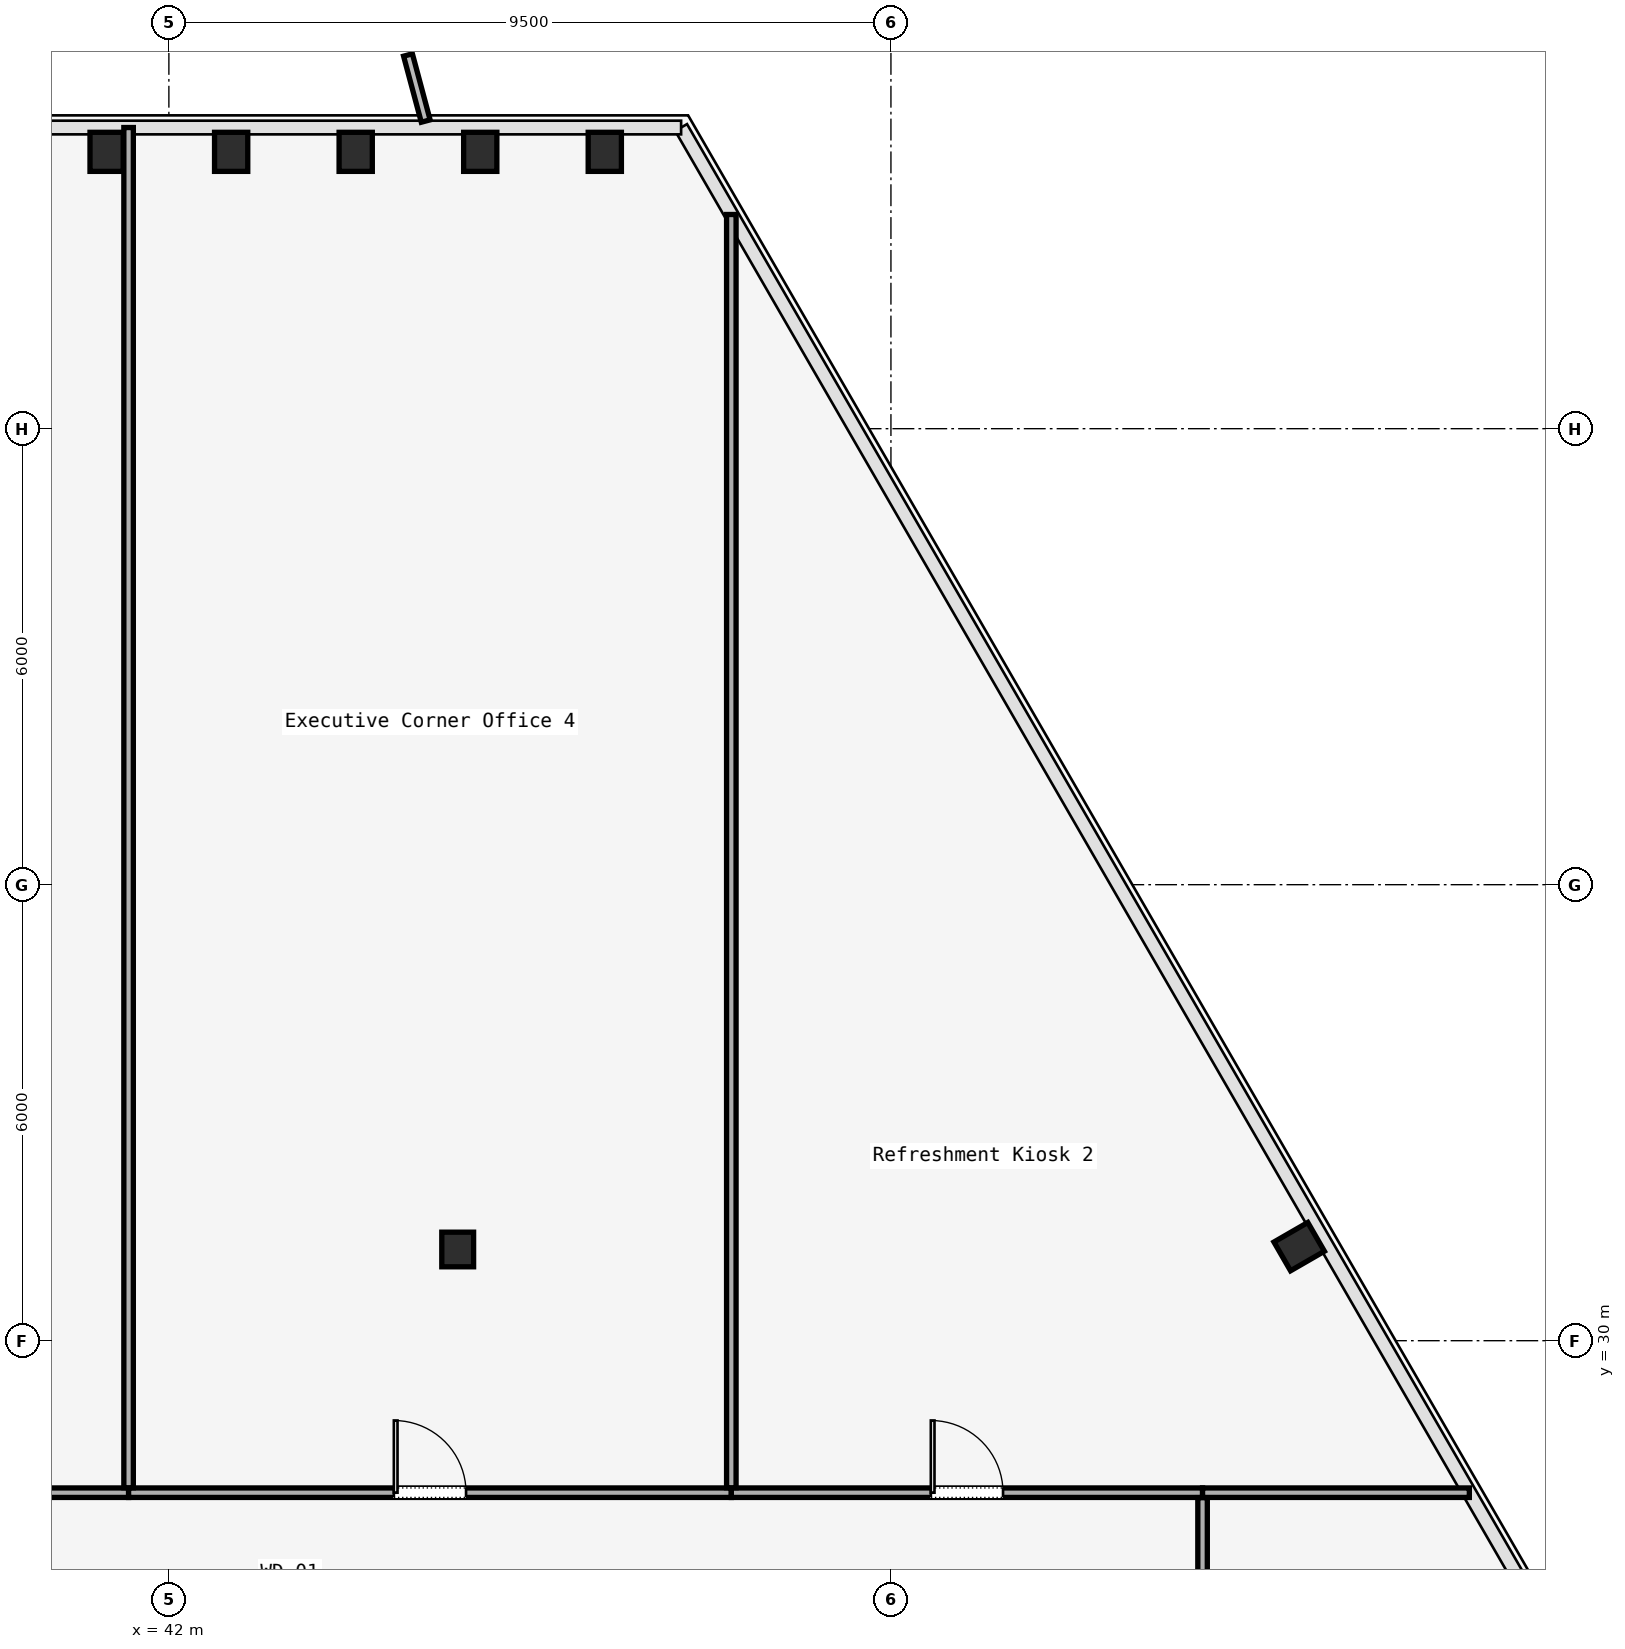
"""IFC4 building model, lengths in metres.
Left out: names, types, materials, properties, quantities, classifications, styles, units other than length and angle.
Written with IfcOpenShell. Run it as: python <this file> out.ifc"""

import sys

from ifc_helpers import new_model, si_unit, direction, frame, frame_2d, origin, origin_2d, place, context, subcontext, project, spatial, rectangle, i_section, extrude, element, fill, save


model = new_model("IFC4")
c1 = context("Model", 3, precision=1e-05, world=origin(), true_north=direction((0.0, 1.0)))
c2 = subcontext(c1, "Body", "Model", "MODEL_VIEW")
j1 = project(units=[si_unit("LENGTHUNIT", "METRE"), si_unit("PLANEANGLEUNIT", "RADIAN")], contexts=[c1])
p1 = place(None, origin())
s1 = spatial("IfcSite", under=j1, at=p1, CompositionType="ELEMENT")
p2 = place(p1, origin())
s2 = spatial("IfcBuilding", under=s1, at=p2, CompositionType="ELEMENT")
p3 = place(p2, frame((0.0, 0.0, 104.4)))
s3 = spatial("IfcBuildingStorey", under=s2, at=p3, CompositionType="ELEMENT", Elevation=104.4)
p4 = place(p3, frame((45.8, 31.2, 0.0), z_axis=(0.0, 0.0, 1.0), x_axis=(1.0, 0.0, 0.0)))
e1 = element("IfcColumn", 1, at=p4, inside=s3, PredefinedType="COLUMN", context=c2, shape_type="SweptSolid", body=[
    extrude(i_section(OverallWidth=0.418, OverallDepth=0.456, WebThickness=0.042, FlangeThickness=0.067, FilletRadius=0.015, at=origin_2d()), origin(), (0.0, 0.0, 1.0), 3.58),
])
for number, where, z_axis, x_axis in (
    (2, (56.871, 31.238, 0.0), (0.0, 0.0, 1.0), (-0.5, 0.866, 0.0)),
    (3, (47.735, 45.643, 0.0), (0.0, 0.0, 1.0), (1.0, 0.0, 0.0)),
    (4, (46.097, 45.643, 0.0), (0.0, 0.0, 1.0), (1.0, 0.0, 0.0)),
    (5, (44.458, 45.643, 0.0), (0.0, 0.0, 1.0), (1.0, 0.0, 0.0)),
    (6, (42.819, 45.643, 0.0), (0.0, 0.0, 1.0), (1.0, 0.0, 0.0)),
    (7, (41.181, 45.643, 0.0), (0.0, 0.0, 1.0), (1.0, 0.0, 0.0)),
):
    element("IfcColumn", number, at=place(p3, frame(where, z_axis=z_axis, x_axis=x_axis)), inside=s3, PredefinedType="COLUMN", context=c2, shape_type="SweptSolid", body=[
        extrude(i_section(OverallWidth=0.437, OverallDepth=0.514, WebThickness=0.061, FlangeThickness=0.077, FilletRadius=0.015, at=origin_2d()), origin(), (0.0, 0.0, 1.0), 3.58),
    ])
p5 = place(p3, frame((36.4, 28.0, 0.0), z_axis=(0.0, 0.0, 1.0), x_axis=(1.0, 0.0, 0.0)))
e8 = element("IfcWall", 8, at=p5, inside=s3, PredefinedType="PARTITIONING", context=c2, shape_type="SweptSolid", body=[
    extrude(rectangle(XDim=5.07, YDim=0.125, at=frame_2d((2.535, 0.0))), origin(), (0.0, 0.0, 1.0), 2.95),
])
p6 = place(p5, frame((2.06, 0.0, 0.0)))
e9 = element("IfcOpeningElement", 9, at=p6, cuts=e8, PredefinedType="OPENING", context=c2, shape_type="SweptSolid", body=[
    extrude(rectangle(XDim=0.95, YDim=2.2, at=frame_2d((0.475, 1.1))), frame((0.0, 0.062, 0.0), z_axis=(0.0, -1.0, 0.0), x_axis=(1.0, 0.0, 0.0)), (0.0, 0.0, 1.0), 0.125),
])
p7 = place(p3, frame((41.47, 28.0, 0.0), z_axis=(0.0, 0.0, 1.0), x_axis=(1.0, 0.0, 0.0)))
e10 = element("IfcWall", 10, at=p7, inside=s3, PredefinedType="PARTITIONING", context=c2, shape_type="SweptSolid", body=[
    extrude(rectangle(XDim=7.93, YDim=0.125, at=frame_2d((3.965, 0.0))), origin(), (0.0, 0.0, 1.0), 2.95),
])
p8 = place(p7, frame((3.49, 0.0, 0.0)))
e11 = element("IfcOpeningElement", 11, at=p8, cuts=e10, PredefinedType="OPENING", context=c2, shape_type="SweptSolid", body=[
    extrude(rectangle(XDim=0.95, YDim=2.2, at=frame_2d((0.475, 1.1))), frame((0.0, 0.062, 0.0), z_axis=(0.0, -1.0, 0.0), x_axis=(1.0, 0.0, 0.0)), (0.0, 0.0, 1.0), 0.125),
])
p9 = place(p3, frame((49.4, 28.0, 0.0), z_axis=(0.0, 0.0, 1.0), x_axis=(1.0, 0.0, 0.0)))
e12 = element("IfcWall", 12, at=p9, inside=s3, PredefinedType="PARTITIONING", context=c2, shape_type="SweptSolid", body=[
    extrude(rectangle(XDim=6.2, YDim=0.125, at=frame_2d((3.1, 0.0))), origin(), (0.0, 0.0, 1.0), 2.95),
])
p10 = place(p9, frame((2.625, 0.0, 0.0)))
e13 = element("IfcOpeningElement", 13, at=p10, cuts=e12, PredefinedType="OPENING", context=c2, shape_type="SweptSolid", body=[
    extrude(rectangle(XDim=0.95, YDim=2.2, at=frame_2d((0.475, 1.1))), frame((0.0, 0.062, 0.0), z_axis=(0.0, -1.0, 0.0), x_axis=(1.0, 0.0, 0.0)), (0.0, 0.0, 1.0), 0.125),
])
p11 = place(p3, frame((55.6, 27.935, 0.0), z_axis=(0.0, 0.0, 1.0), x_axis=(0.0, -1.0, 0.0)))
e14 = element("IfcWall", 14, at=p11, inside=s3, PredefinedType="PARTITIONING", context=c2, shape_type="SweptSolid", body=[
    extrude(rectangle(XDim=1.735, YDim=0.125, at=frame_2d((0.868, 0.0))), origin(), (0.0, 0.0, 1.0), 2.95),
])
p12 = place(p3, frame((55.6, 28.0, 0.0), z_axis=(0.0, 0.0, 1.0), x_axis=(1.0, 0.0, 0.0)))
e15 = element("IfcWall", 15, at=p12, inside=s3, PredefinedType="PARTITIONING", context=c2, shape_type="SweptSolid", body=[
    extrude(rectangle(XDim=3.51, YDim=0.125, at=frame_2d((1.755, 0.0))), origin(), (0.0, 0.0, 1.0), 2.95),
])
p13 = place(p3, frame((49.4, 28.065, 0.0), z_axis=(0.0, 0.0, 1.0), x_axis=(0.0, 1.0, 0.0)))
e16 = element("IfcWall", 16, at=p13, inside=s3, PredefinedType="PARTITIONING", context=c2, shape_type="SweptSolid", body=[
    extrude(rectangle(XDim=16.753, YDim=0.125, at=frame_2d((8.377, 0.0))), origin(), (0.0, 0.0, 1.0), 2.95),
])
p14 = place(p3, frame((41.47, 28.065, 0.0), z_axis=(0.0, 0.0, 1.0), x_axis=(0.0, 1.0, 0.0)))
e17 = element("IfcWall", 17, at=p14, inside=s3, PredefinedType="PARTITIONING", context=c2, shape_type="SweptSolid", body=[
    extrude(rectangle(XDim=17.898, YDim=0.125, at=frame_2d((8.949, 0.0))), origin(), (0.0, 0.0, 1.0), 2.95),
])
p15 = place(p10, origin())
e18 = element("IfcDoor", 18, at=p15, inside=s3, OperationType="SINGLE_SWING_LEFT", PredefinedType="DOOR", context=c2, shape_type="SweptSolid", body=[
    extrude(rectangle(XDim=0.95, YDim=2.2, at=frame_2d((0.475, 1.1))), frame((0.0, 0.025, 0.0), z_axis=(0.0, -1.0, 0.0), x_axis=(1.0, 0.0, 0.0)), (0.0, 0.0, 1.0), 0.05),
])
fill(e13, e18)
p16 = place(p8, origin())
e19 = element("IfcDoor", 19, at=p16, inside=s3, OperationType="SINGLE_SWING_LEFT", PredefinedType="DOOR", context=c2, shape_type="SweptSolid", body=[
    extrude(rectangle(XDim=0.95, YDim=2.2, at=frame_2d((0.475, 1.1))), frame((0.0, 0.025, 0.0), z_axis=(0.0, -1.0, 0.0), x_axis=(1.0, 0.0, 0.0)), (0.0, 0.0, 1.0), 0.05),
])
fill(e11, e19)
save(model, sys.argv[1])
